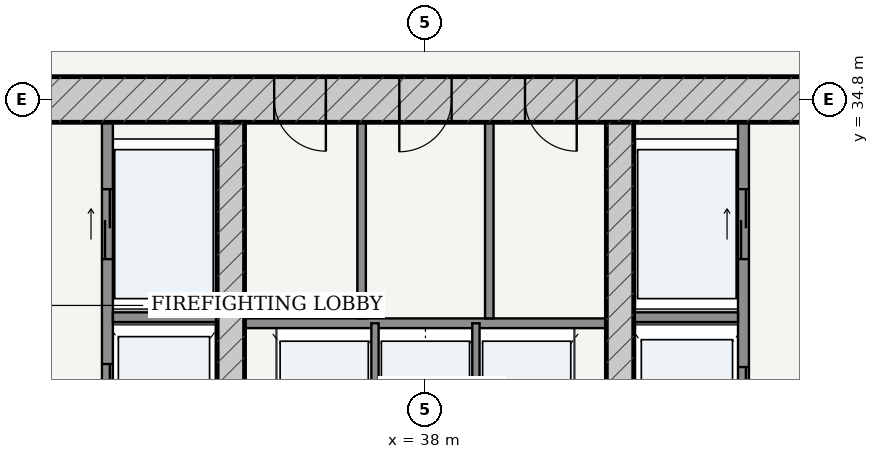
"""IFC4 building model, lengths in metres.
Left out: names, types, materials, properties, quantities, classifications, styles, units other than length and angle.
Written with IfcOpenShell. Run it as: python <this file> out.ifc"""

import sys

from ifc_helpers import new_model, si_unit, direction, frame, frame_2d, origin, place, context, subcontext, project, spatial, rectangle, extrude, source, transform, mapped, element, fill, save


model = new_model("IFC4")
c1 = context("Model", 3, precision=1e-05, world=origin(), true_north=direction((-0.2419218956, 0.970295726276)))
c2 = subcontext(c1, "Body", "Model", "MODEL_VIEW")
j1 = project(units=[si_unit("LENGTHUNIT", "METRE"), si_unit("PLANEANGLEUNIT", "RADIAN")], contexts=[c1])
p1 = place(None, origin())
s1 = spatial("IfcSite", under=j1, at=p1, CompositionType="ELEMENT")
p2 = place(p1, origin())
s2 = spatial("IfcBuilding", under=s1, at=p2, CompositionType="ELEMENT")
p3 = place(p2, origin())
s3 = spatial("IfcBuildingStorey", under=s2, at=p3, CompositionType="ELEMENT", Elevation=0.0)
p4 = place(p3, frame((28.625, 34.8, 0.0), z_axis=(0.0, 0.0, 1.0), x_axis=(1.0, 0.0, 0.0)))
e1 = element("IfcWall", 1, at=p4, inside=s3, PredefinedType="SHEAR", context=c2, shape_type="SweptSolid", body=[
    extrude(rectangle(XDim=18.75, YDim=0.75, at=frame_2d((9.375, 0.0))), origin(), (0.0, 0.0, 1.0), 5.1),
])
p5 = place(p4, frame((6.887, 0.0, 0.0)))
e2 = element("IfcOpeningElement", 2, at=p5, cuts=e1, PredefinedType="OPENING", context=c2, shape_type="SweptSolid", body=[
    extrude(rectangle(XDim=0.85, YDim=2.1, at=frame_2d((0.425, 1.05))), frame((0.0, 0.385, 0.0), z_axis=(0.0, -1.0, 0.0), x_axis=(1.0, 0.0, 0.0)), (0.0, 0.0, 1.0), 0.77),
])
p6 = place(p4, frame((8.945, 0.0, 0.0)))
e3 = element("IfcOpeningElement", 3, at=p6, cuts=e1, PredefinedType="OPENING", context=c2, shape_type="SweptSolid", body=[
    extrude(rectangle(XDim=0.86, YDim=2.1, at=frame_2d((0.43, 1.05))), frame((0.0, 0.385, 0.0), z_axis=(0.0, -1.0, 0.0), x_axis=(1.0, 0.0, 0.0)), (0.0, 0.0, 1.0), 0.77),
])
p7 = place(p4, frame((11.012, 0.0, 0.0)))
e4 = element("IfcOpeningElement", 4, at=p7, cuts=e1, PredefinedType="OPENING", context=c2, shape_type="SweptSolid", body=[
    extrude(rectangle(XDim=0.85, YDim=2.1, at=frame_2d((0.425, 1.05))), frame((0.0, 0.385, 0.0), z_axis=(0.0, -1.0, 0.0), x_axis=(1.0, 0.0, 0.0)), (0.0, 0.0, 1.0), 0.77),
])
p8 = place(p3, frame((34.8, 19.175, 0.0), z_axis=(0.0, 0.0, 1.0), x_axis=(0.0, 1.0, 0.0)))
e5 = element("IfcWall", 5, at=p8, inside=s3, PredefinedType="SHEAR", context=c2, shape_type="SweptSolid", body=[
    extrude(rectangle(XDim=15.25, YDim=0.45, at=frame_2d((7.625, 0.0))), origin(), (0.0, 0.0, 1.0), 5.1),
])
p9 = place(p8, frame((7.8, 0.0, 0.0)))
e6 = element("IfcOpeningElement", 6, at=p9, cuts=e5, PredefinedType="OPENING", context=c2, shape_type="SweptSolid", body=[
    extrude(rectangle(XDim=1.05, YDim=2.15, at=frame_2d((0.525, 1.075))), frame((0.0, 0.235, 0.0), z_axis=(0.0, -1.0, 0.0), x_axis=(1.0, 0.0, 0.0)), (0.0, 0.0, 1.0), 0.47),
])
p10 = place(p3, frame((41.2, 19.175, 0.0), z_axis=(0.0, 0.0, 1.0), x_axis=(0.0, 1.0, 0.0)))
e7 = element("IfcWall", 7, at=p10, inside=s3, PredefinedType="SHEAR", context=c2, shape_type="SweptSolid", body=[
    extrude(rectangle(XDim=15.25, YDim=0.45, at=frame_2d((7.625, 0.0))), origin(), (0.0, 0.0, 1.0), 5.1),
])
p11 = place(p10, frame((7.8, 0.0, 0.0)))
e8 = element("IfcOpeningElement", 8, at=p11, cuts=e7, PredefinedType="OPENING", context=c2, shape_type="SweptSolid", body=[
    extrude(rectangle(XDim=1.05, YDim=2.15, at=frame_2d((0.525, 1.075))), frame((0.0, 0.235, 0.0), z_axis=(0.0, -1.0, 0.0), x_axis=(1.0, 0.0, 0.0)), (0.0, 0.0, 1.0), 0.47),
])
p12 = place(p3, frame((32.77, 28.52, 0.0), z_axis=(0.0, 0.0, 1.0), x_axis=(0.0, 1.0, 0.0)))
e9 = element("IfcWall", 9, at=p12, inside=s3, PredefinedType="PARTITIONING", context=c2, shape_type="SweptSolid", body=[
    extrude(rectangle(XDim=5.905, YDim=0.18, at=frame_2d((2.953, 0.0))), origin(), (0.0, 0.0, 1.0), 5.1),
])
p13 = place(p12, frame((3.655, 0.0, 0.0)))
e10 = element("IfcOpeningElement", 10, at=p13, cuts=e9, PredefinedType="OPENING", context=c2, shape_type="SweptSolid", body=[
    extrude(rectangle(XDim=1.15, YDim=2.2, at=frame_2d((0.575, 1.1))), frame((0.0, 0.1, 0.0), z_axis=(0.0, -1.0, 0.0), x_axis=(1.0, 0.0, 0.0)), (0.0, 0.0, 1.0), 0.2),
])
p14 = place(p12, frame((0.73, 0.0, 0.0)))
e11 = element("IfcOpeningElement", 11, at=p14, cuts=e9, PredefinedType="OPENING", context=c2, shape_type="SweptSolid", body=[
    extrude(rectangle(XDim=1.2, YDim=2.25, at=frame_2d((0.6, 1.125))), frame((0.0, 0.1, 0.0), z_axis=(0.0, -1.0, 0.0), x_axis=(1.0, 0.0, 0.0)), (0.0, 0.0, 1.0), 0.2),
])
p15 = place(p3, frame((32.86, 31.22, 0.0), z_axis=(0.0, 0.0, 1.0), x_axis=(1.0, 0.0, 0.0)))
e12 = element("IfcWall", 12, at=p15, inside=s3, PredefinedType="PARTITIONING", context=c2, shape_type="SweptSolid", body=[
    extrude(rectangle(XDim=1.715, YDim=0.16, at=frame_2d((0.857, 0.0))), origin(), (0.0, 0.0, 1.0), 5.1),
])
p16 = place(p3, frame((43.23, 28.52, 0.0), z_axis=(0.0, 0.0, 1.0), x_axis=(0.0, 1.0, 0.0)))
e13 = element("IfcWall", 13, at=p16, inside=s3, PredefinedType="PARTITIONING", context=c2, shape_type="SweptSolid", body=[
    extrude(rectangle(XDim=5.905, YDim=0.18, at=frame_2d((2.953, 0.0))), origin(), (0.0, 0.0, 1.0), 5.1),
])
p17 = place(p16, frame((3.655, 0.0, 0.0)))
e14 = element("IfcOpeningElement", 14, at=p17, cuts=e13, PredefinedType="OPENING", context=c2, shape_type="SweptSolid", body=[
    extrude(rectangle(XDim=1.15, YDim=2.2, at=frame_2d((0.575, 1.1))), frame((0.0, 0.1, 0.0), z_axis=(0.0, -1.0, 0.0), x_axis=(1.0, 0.0, 0.0)), (0.0, 0.0, 1.0), 0.2),
])
p18 = place(p16, frame((0.78, 0.0, 0.0)))
e15 = element("IfcOpeningElement", 15, at=p18, cuts=e13, PredefinedType="OPENING", context=c2, shape_type="SweptSolid", body=[
    extrude(rectangle(XDim=1.1, YDim=2.2, at=frame_2d((0.55, 1.1))), frame((0.0, 0.1, 0.0), z_axis=(0.0, -1.0, 0.0), x_axis=(1.0, 0.0, 0.0)), (0.0, 0.0, 1.0), 0.2),
])
p19 = place(p3, frame((41.425, 31.22, 0.0), z_axis=(0.0, 0.0, 1.0), x_axis=(1.0, 0.0, 0.0)))
e16 = element("IfcWall", 16, at=p19, inside=s3, PredefinedType="PARTITIONING", context=c2, shape_type="SweptSolid", body=[
    extrude(rectangle(XDim=1.715, YDim=0.16, at=frame_2d((0.857, 0.0))), origin(), (0.0, 0.0, 1.0), 5.1),
])
p20 = place(p3, frame((35.025, 31.12, 0.0), z_axis=(0.0, 0.0, 1.0), x_axis=(1.0, 0.0, 0.0)))
e17 = element("IfcWall", 17, at=p20, inside=s3, PredefinedType="PARTITIONING", context=c2, shape_type="SweptSolid", body=[
    extrude(rectangle(XDim=5.95, YDim=0.16, at=frame_2d((2.975, 0.0))), origin(), (0.0, 0.0, 1.0), 5.1),
])
for number, where, z_axis, x_axis in (
    (18, (37.17, 28.56, 0.0), (0.0, 0.0, 1.0), (0.0, 1.0, 0.0)),
    (19, (38.83, 28.56, 0.0), (0.0, 0.0, 1.0), (0.0, 1.0, 0.0)),
):
    element("IfcWall", number, at=place(p3, frame(where, z_axis=z_axis, x_axis=x_axis)), inside=s3, PredefinedType="PARTITIONING", context=c2, shape_type="SweptSolid", body=[
        extrude(rectangle(XDim=2.56, YDim=0.12, at=frame_2d((1.28, 0.0))), origin(), (0.0, 0.0, 1.0), 5.1),
    ])
for number, where, z_axis, x_axis in (
    (20, (36.95, 31.2, 0.0), (0.0, 0.0, 1.0), (0.0, 1.0, 0.0)),
    (21, (39.05, 31.2, 0.0), (0.0, 0.0, 1.0), (0.0, 1.0, 0.0)),
):
    element("IfcWall", number, at=place(p3, frame(where, z_axis=z_axis, x_axis=x_axis)), inside=s3, PredefinedType="PARTITIONING", context=c2, shape_type="SweptSolid", body=[
        extrude(rectangle(XDim=3.225, YDim=0.14, at=frame_2d((1.613, 0.0))), origin(), (0.0, 0.0, 1.0), 5.1),
    ])
m1 = source(origin(), c2, "Body", "SweptSolid", [
    extrude(rectangle(XDim=0.85, YDim=2.1, at=frame_2d((0.425, 1.05))), frame((0.0, 0.025, 0.0), z_axis=(0.0, -1.0, 0.0), x_axis=(1.0, 0.0, 0.0)), (0.0, 0.0, 1.0), 0.05),
])
p21 = place(p5, frame((0.85, 0.0, 0.0), z_axis=(0.0, 0.0, 1.0), x_axis=(-1.0, 0.0, 0.0)))
e22 = element("IfcDoor", 22, at=p21, inside=s3, OperationType="SINGLE_SWING_LEFT", PredefinedType="DOOR", context=c2, shape_type="MappedRepresentation", body=[
    mapped(m1, transform((0.0, 0.0, 0.0), scale=1.0)),
])
fill(e2, e22)
m2 = source(origin(), c2, "Body", "SweptSolid", [
    extrude(rectangle(XDim=0.86, YDim=2.1, at=frame_2d((0.43, 1.05))), frame((0.0, 0.025, 0.0), z_axis=(0.0, -1.0, 0.0), x_axis=(1.0, 0.0, 0.0)), (0.0, 0.0, 1.0), 0.05),
])
p22 = place(p6, frame((0.86, 0.0, 0.0), z_axis=(0.0, 0.0, 1.0), x_axis=(-1.0, 0.0, 0.0)))
e23 = element("IfcDoor", 23, at=p22, inside=s3, OperationType="SINGLE_SWING_RIGHT", PredefinedType="DOOR", context=c2, shape_type="MappedRepresentation", body=[
    mapped(m2, transform((0.0, 0.0, 0.0), scale=1.0)),
])
fill(e3, e23)
p23 = place(p7, frame((0.85, 0.0, 0.0), z_axis=(0.0, 0.0, 1.0), x_axis=(-1.0, 0.0, 0.0)))
e24 = element("IfcDoor", 24, at=p23, inside=s3, OperationType="SINGLE_SWING_LEFT", PredefinedType="DOOR", context=c2, shape_type="MappedRepresentation", body=[
    mapped(m1, transform((0.0, 0.0, 0.0), scale=1.0)),
])
fill(e4, e24)
m3 = source(origin(), c2, "Body", "SweptSolid", [
    extrude(rectangle(XDim=1.15, YDim=2.2, at=frame_2d((0.575, 1.1))), frame((0.0, 0.025, 0.0), z_axis=(0.0, -1.0, 0.0), x_axis=(1.0, 0.0, 0.0)), (0.0, 0.0, 1.0), 0.05),
])
p24 = place(p13, origin())
e25 = element("IfcDoor", 25, at=p24, inside=s3, OperationType="DOUBLE_DOOR_SLIDING", PredefinedType="DOOR", context=c2, shape_type="MappedRepresentation", body=[
    mapped(m3, transform((0.0, 0.0, 0.0), scale=1.0)),
])
fill(e10, e25)
p25 = place(p17, origin())
e26 = element("IfcDoor", 26, at=p25, inside=s3, OperationType="DOUBLE_DOOR_SLIDING", PredefinedType="DOOR", context=c2, shape_type="MappedRepresentation", body=[
    mapped(m3, transform((0.0, 0.0, 0.0), scale=1.0)),
])
fill(e14, e26)
m4 = source(origin(), c2, "Body", "SweptSolid", [
    extrude(rectangle(XDim=1.2, YDim=2.25, at=frame_2d((0.6, 1.125))), frame((0.0, 0.025, 0.0), z_axis=(0.0, -1.0, 0.0), x_axis=(1.0, 0.0, 0.0)), (0.0, 0.0, 1.0), 0.05),
])
p26 = place(p14, origin())
e27 = element("IfcDoor", 27, at=p26, inside=s3, OperationType="DOUBLE_DOOR_SLIDING", PredefinedType="DOOR", context=c2, shape_type="MappedRepresentation", body=[
    mapped(m4, transform((0.0, 0.0, 0.0), scale=1.0)),
])
fill(e11, e27)
m5 = source(origin(), c2, "Body", "SweptSolid", [
    extrude(rectangle(XDim=1.1, YDim=2.2, at=frame_2d((0.55, 1.1))), frame((0.0, 0.025, 0.0), z_axis=(0.0, -1.0, 0.0), x_axis=(1.0, 0.0, 0.0)), (0.0, 0.0, 1.0), 0.05),
])
p27 = place(p18, origin())
e28 = element("IfcDoor", 28, at=p27, inside=s3, OperationType="DOUBLE_DOOR_SLIDING", PredefinedType="DOOR", context=c2, shape_type="MappedRepresentation", body=[
    mapped(m5, transform((0.0, 0.0, 0.0), scale=1.0)),
])
fill(e15, e28)
save(model, sys.argv[1])
